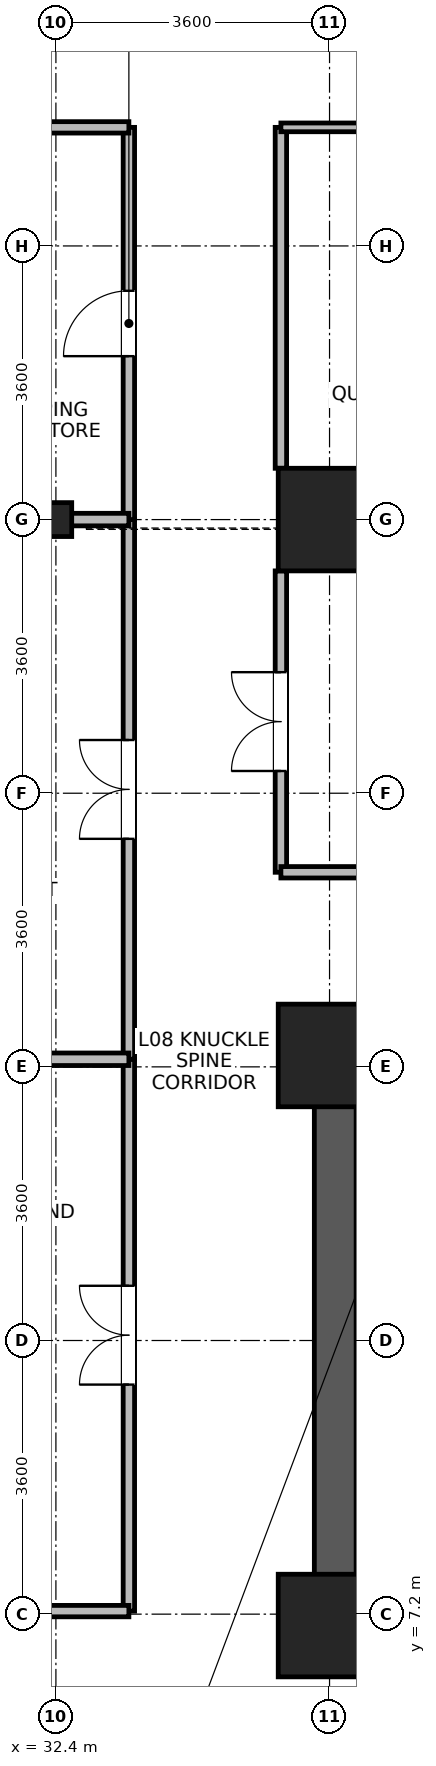
"""IFC4 building model, lengths in metres.
Left out: names, types, materials, properties, quantities, classifications, styles, units other than length and angle.
Written with IfcOpenShell. Run it as: python <this file> out.ifc"""

import sys

from ifc_helpers import new_model, si_unit, direction, frame, frame_2d, origin, origin_2d, place, context, subcontext, project, spatial, rectangle, i_section, extrude, source, transform, mapped, element, fill, save


model = new_model("IFC4")
c1 = context("Model", 3, precision=1e-05, world=origin(), true_north=direction((0.0, 1.0)))
c2 = subcontext(c1, "Body", "Model", "MODEL_VIEW")
j1 = project(units=[si_unit("LENGTHUNIT", "METRE"), si_unit("PLANEANGLEUNIT", "RADIAN")], contexts=[c1])
p1 = place(None, origin())
s1 = spatial("IfcSite", under=j1, at=p1, CompositionType="ELEMENT")
p2 = place(p1, origin())
s2 = spatial("IfcBuilding", under=s1, at=p2, CompositionType="ELEMENT")
p3 = place(p2, frame((0.0, 0.0, 36.4)))
s3 = spatial("IfcBuildingStorey", under=s2, at=p3, CompositionType="ELEMENT", Elevation=36.4)
p4 = place(p3, frame((36.075, 6.75, 0.0), z_axis=(0.0, 0.0, 1.0), x_axis=(0.0, 1.0, 0.0)))
e1 = element("IfcWall", 1, at=p4, inside=s3, PredefinedType="SHEAR", context=c2, shape_type="SweptSolid", body=[
    extrude(rectangle(XDim=8.1, YDim=0.55, at=frame_2d((4.05, 0.0))), origin(), (0.0, 0.0, 1.0), 3.45),
])
m1 = source(origin(), c2, "Body", "SweptSolid", [
    extrude(rectangle(XDim=1.35, YDim=1.35, at=origin_2d()), origin(), (0.0, 0.0, 1.0), 3.7),
])
for number, where, z_axis, x_axis in (
    (2, (36.0, 21.6, 0.0), (0.0, 0.0, 1.0), (1.0, 0.0, 0.0)),
    (3, (36.0, 7.05, 0.0), (0.0, 0.0, 1.0), (1.0, 0.0, 0.0)),
    (4, (36.0, 14.55, 0.0), (0.0, 0.0, 1.0), (1.0, 0.0, 0.0)),
):
    element("IfcColumn", number, at=place(p3, frame(where, z_axis=z_axis, x_axis=x_axis)), inside=s3, PredefinedType="COLUMN", context=c2, shape_type="MappedRepresentation", body=[
        mapped(m1, transform((0.0, 0.0, 0.0), x_axis=(1.0, 0.0, 0.0), y_axis=(0.0, 1.0, 0.0), z_axis=(0.0, 0.0, 1.0), scale=1.0)),
    ])
m2 = source(origin(), c2, "Body", "SweptSolid", [
    extrude(i_section(OverallWidth=0.416, OverallDepth=0.446, WebThickness=0.029, FlangeThickness=0.04, FilletRadius=0.015, at=origin_2d()), origin(), (0.0, 0.0, 1.0), 3.7),
])
p5 = place(p3, frame((32.4, 21.6, 0.0), z_axis=(0.0, 0.0, 1.0), x_axis=(1.0, 0.0, 0.0)))
e5 = element("IfcColumn", 5, at=p5, inside=s3, PredefinedType="COLUMN", context=c2, shape_type="MappedRepresentation", body=[
    mapped(m2, transform((0.0, 0.0, 0.0), x_axis=(1.0, 0.0, 0.0), y_axis=(0.0, 1.0, 0.0), z_axis=(0.0, 0.0, 1.0), scale=1.0)),
])
p6 = place(p3, frame((35.36, 16.96, 0.0), z_axis=(0.0, 0.0, 1.0), x_axis=(0.0, 1.0, 0.0)))
e6 = element("IfcWall", 6, at=p6, inside=s3, PredefinedType="PARTITIONING", context=c2, shape_type="SweptSolid", body=[
    extrude(rectangle(XDim=3.965, YDim=0.15, at=frame_2d((1.982, 0.0))), origin(), (0.0, 0.0, 1.0), 3.43),
])
p7 = place(p6, frame((1.333, 0.0, 0.0)))
e7 = element("IfcOpeningElement", 7, at=p7, cuts=e6, PredefinedType="OPENING", context=c2, shape_type="SweptSolid", body=[
    extrude(rectangle(XDim=1.3, YDim=2.12, at=frame_2d((0.65, 1.06))), frame((0.0, 0.085, 0.0), z_axis=(0.0, -1.0, 0.0), x_axis=(1.0, 0.0, 0.0)), (0.0, 0.0, 1.0), 0.17),
])
p8 = place(p3, frame((35.36, 22.275, 0.0), z_axis=(0.0, 0.0, 1.0), x_axis=(0.0, 1.0, 0.0)))
e8 = element("IfcWall", 8, at=p8, inside=s3, PredefinedType="PARTITIONING", context=c2, shape_type="SweptSolid", body=[
    extrude(rectangle(XDim=4.485, YDim=0.15, at=frame_2d((2.243, 0.0))), origin(), (0.0, 0.0, 1.0), 3.43),
])
p9 = place(p3, frame((33.36, 7.24, 0.0), z_axis=(0.0, 0.0, 1.0), x_axis=(0.0, 1.0, 0.0)))
e9 = element("IfcWall", 9, at=p9, inside=s3, PredefinedType="PARTITIONING", context=c2, shape_type="SweptSolid", body=[
    extrude(rectangle(XDim=7.26, YDim=0.15, at=frame_2d((3.63, 0.0))), origin(), (0.0, 0.0, 1.0), 3.43),
])
p10 = place(p9, frame((2.98, 0.0, 0.0)))
e10 = element("IfcOpeningElement", 10, at=p10, cuts=e9, PredefinedType="OPENING", context=c2, shape_type="SweptSolid", body=[
    extrude(rectangle(XDim=1.3, YDim=2.12, at=frame_2d((0.65, 1.06))), frame((0.0, 0.085, 0.0), z_axis=(0.0, -1.0, 0.0), x_axis=(1.0, 0.0, 0.0)), (0.0, 0.0, 1.0), 0.17),
])
p11 = place(p3, frame((33.36, 14.5, 0.0), z_axis=(0.0, 0.0, 1.0), x_axis=(0.0, 1.0, 0.0)))
e11 = element("IfcWall", 11, at=p11, inside=s3, PredefinedType="PARTITIONING", context=c2, shape_type="SweptSolid", body=[
    extrude(rectangle(XDim=7.1, YDim=0.15, at=frame_2d((3.55, 0.0))), origin(), (0.0, 0.0, 1.0), 3.43),
])
p12 = place(p11, frame((2.9, 0.0, 0.0)))
e12 = element("IfcOpeningElement", 12, at=p12, cuts=e11, PredefinedType="OPENING", context=c2, shape_type="SweptSolid", body=[
    extrude(rectangle(XDim=1.3, YDim=2.12, at=frame_2d((0.65, 1.06))), frame((0.0, 0.085, 0.0), z_axis=(0.0, -1.0, 0.0), x_axis=(1.0, 0.0, 0.0)), (0.0, 0.0, 1.0), 0.17),
])
p13 = place(p3, frame((33.36, 21.6, 0.0), z_axis=(0.0, 0.0, 1.0), x_axis=(0.0, 1.0, 0.0)))
e13 = element("IfcWall", 13, at=p13, inside=s3, PredefinedType="PARTITIONING", context=c2, shape_type="SweptSolid", body=[
    extrude(rectangle(XDim=5.16, YDim=0.15, at=frame_2d((2.58, 0.0))), origin(), (0.0, 0.0, 1.0), 3.43),
])
p14 = place(p13, frame((2.15, 0.0, 0.0)))
e14 = element("IfcOpeningElement", 14, at=p14, cuts=e13, PredefinedType="OPENING", context=c2, shape_type="SweptSolid", body=[
    extrude(rectangle(XDim=0.86, YDim=2.02, at=frame_2d((0.43, 1.01))), frame((0.0, 0.085, 0.0), z_axis=(0.0, -1.0, 0.0), x_axis=(1.0, 0.0, 0.0)), (0.0, 0.0, 1.0), 0.17),
])
p15 = place(p3, frame((35.36, 16.96, 0.0), z_axis=(0.0, 0.0, 1.0), x_axis=(1.0, 0.0, 0.0)))
e15 = element("IfcWall", 15, at=p15, inside=s3, PredefinedType="PARTITIONING", context=c2, shape_type="SweptSolid", body=[
    extrude(rectangle(XDim=4.92, YDim=0.15, at=frame_2d((2.46, 0.0))), origin(), (0.0, 0.0, 1.0), 3.43),
])
p16 = place(p3, frame((28.932, 7.24, 0.0), z_axis=(0.0, 0.0, 1.0), x_axis=(1.0, 0.0, 0.0)))
e16 = element("IfcWall", 16, at=p16, inside=s3, PredefinedType="PARTITIONING", context=c2, shape_type="SweptSolid", body=[
    extrude(rectangle(XDim=4.428, YDim=0.15, at=frame_2d((2.214, 0.0))), origin(), (0.0, 0.0, 1.0), 3.43),
])
p17 = place(p3, frame((30.44, 26.76, 0.0), z_axis=(0.0, 0.0, 1.0), x_axis=(1.0, 0.0, 0.0)))
e17 = element("IfcWall", 17, at=p17, inside=s3, PredefinedType="PARTITIONING", context=c2, shape_type="SweptSolid", body=[
    extrude(rectangle(XDim=2.92, YDim=0.15, at=frame_2d((1.46, 0.0))), origin(), (0.0, 0.0, 1.0), 3.43),
])
p18 = place(p3, frame((35.36, 26.76, 0.0), z_axis=(0.0, 0.0, 1.0), x_axis=(1.0, 0.0, 0.0)))
e18 = element("IfcWall", 18, at=p18, inside=s3, PredefinedType="PARTITIONING", context=c2, shape_type="SweptSolid", body=[
    extrude(rectangle(XDim=4.92, YDim=0.115, at=frame_2d((2.46, 0.0))), origin(), (0.0, 0.0, 1.0), 3.43),
])
p19 = place(p3, frame((28.932, 14.5, 0.0), z_axis=(0.0, 0.0, 1.0), x_axis=(1.0, 0.0, 0.0)))
e19 = element("IfcWall", 19, at=p19, inside=s3, PredefinedType="PARTITIONING", context=c2, shape_type="SweptSolid", body=[
    extrude(rectangle(XDim=4.428, YDim=0.165, at=frame_2d((2.214, 0.0))), origin(), (0.0, 0.0, 1.0), 3.43),
])
p20 = place(p3, frame((30.44, 21.6, 0.0), z_axis=(0.0, 0.0, 1.0), x_axis=(1.0, 0.0, 0.0)))
e20 = element("IfcWall", 20, at=p20, inside=s3, PredefinedType="PARTITIONING", context=c2, shape_type="SweptSolid", body=[
    extrude(rectangle(XDim=2.92, YDim=0.165, at=frame_2d((1.46, 0.0))), origin(), (0.0, 0.0, 1.0), 2.93),
])
p21 = place(p7, origin())
e21 = element("IfcDoor", 21, at=p21, inside=s3, OperationType="DOUBLE_DOOR_SINGLE_SWING", PredefinedType="DOOR", context=c2, shape_type="SweptSolid", body=[
    extrude(rectangle(XDim=1.3, YDim=2.12, at=frame_2d((0.65, 1.06))), frame((0.0, 0.025, 0.0), z_axis=(0.0, -1.0, 0.0), x_axis=(1.0, 0.0, 0.0)), (0.0, 0.0, 1.0), 0.05),
])
fill(e7, e21)
p22 = place(p10, origin())
e22 = element("IfcDoor", 22, at=p22, inside=s3, OperationType="DOUBLE_DOOR_SINGLE_SWING", PredefinedType="DOOR", context=c2, shape_type="SweptSolid", body=[
    extrude(rectangle(XDim=1.3, YDim=2.12, at=frame_2d((0.65, 1.06))), frame((0.0, 0.025, 0.0), z_axis=(0.0, -1.0, 0.0), x_axis=(1.0, 0.0, 0.0)), (0.0, 0.0, 1.0), 0.05),
])
fill(e10, e22)
p23 = place(p12, origin())
e23 = element("IfcDoor", 23, at=p23, inside=s3, OperationType="DOUBLE_DOOR_SINGLE_SWING", PredefinedType="DOOR", context=c2, shape_type="SweptSolid", body=[
    extrude(rectangle(XDim=1.3, YDim=2.12, at=frame_2d((0.65, 1.06))), frame((0.0, 0.025, 0.0), z_axis=(0.0, -1.0, 0.0), x_axis=(1.0, 0.0, 0.0)), (0.0, 0.0, 1.0), 0.05),
])
fill(e12, e23)
p24 = place(p14, origin())
e24 = element("IfcDoor", 24, at=p24, inside=s3, OperationType="SINGLE_SWING_LEFT", PredefinedType="DOOR", context=c2, shape_type="SweptSolid", body=[
    extrude(rectangle(XDim=0.86, YDim=2.02, at=frame_2d((0.43, 1.01))), frame((0.0, 0.025, 0.0), z_axis=(0.0, -1.0, 0.0), x_axis=(1.0, 0.0, 0.0)), (0.0, 0.0, 1.0), 0.05),
])
fill(e14, e24)
save(model, sys.argv[1])
